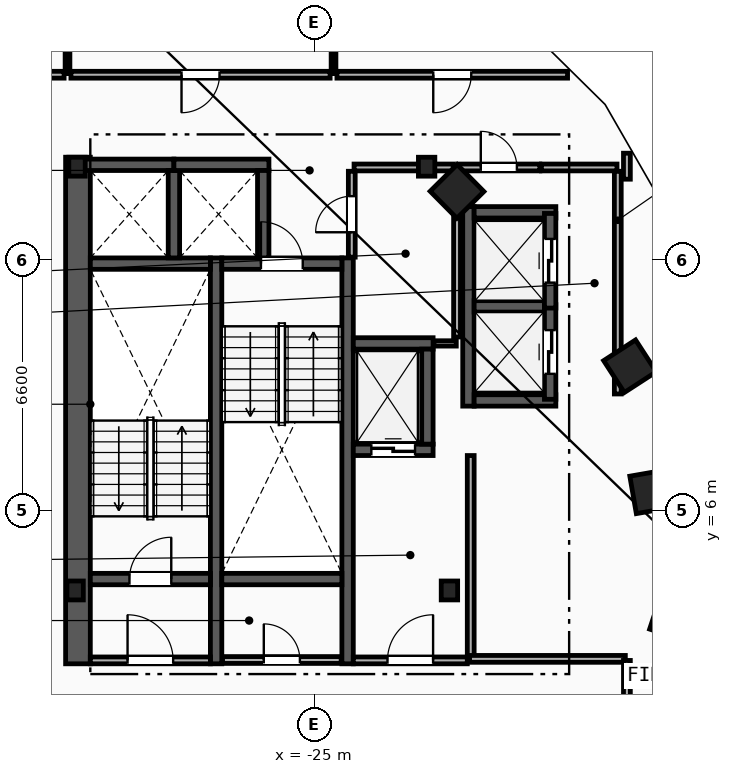
"""IFC4 building model, lengths in metres.
Left out: names, types, materials, properties, quantities, classifications, styles, units other than length and angle.
Written with IfcOpenShell. Run it as: python <this file> out.ifc"""

import sys

from ifc_helpers import new_model, si_unit, direction, frame, frame_2d, origin, origin_2d, place, context, subcontext, project, spatial, rectangle, i_section, extrude, element, fill, save


model = new_model("IFC4")
c1 = context("Model", 3, precision=1e-05, world=origin(), true_north=direction((0.0, 1.0)))
c2 = subcontext(c1, "Body", "Model", "MODEL_VIEW")
j1 = project(units=[si_unit("LENGTHUNIT", "METRE"), si_unit("PLANEANGLEUNIT", "RADIAN")], contexts=[c1])
p1 = place(None, origin())
s1 = spatial("IfcSite", under=j1, at=p1, CompositionType="ELEMENT")
p2 = place(p1, origin())
s2 = spatial("IfcBuilding", under=s1, at=p2, CompositionType="ELEMENT")
p3 = place(p2, frame((0.0, 0.0, 176.4)))
s3 = spatial("IfcBuildingStorey", under=s2, at=p3, CompositionType="ELEMENT", Elevation=176.4)
for number, where, z_axis, x_axis in (
    (1, (-31.3, 3.9, 0.0), (0.0, 0.0, 1.0), (1.0, 0.0, 0.0)),
    (2, (-21.45, 3.9, 0.0), (0.0, 0.0, 1.0), (1.0, 0.0, 0.0)),
    (3, (-22.05, 15.05, 0.0), (0.0, 0.0, 1.0), (1.0, 0.0, 0.0)),
    (4, (-31.25, 15.05, 0.0), (0.0, 0.0, 1.0), (1.0, 0.0, 0.0)),
):
    element("IfcColumn", number, at=place(p3, frame(where, z_axis=z_axis, x_axis=x_axis)), inside=s3, PredefinedType="COLUMN", context=c2, shape_type="SweptSolid", body=[
        extrude(i_section(OverallWidth=0.432, OverallDepth=0.498, WebThickness=0.056, FlangeThickness=0.089, FilletRadius=0.018, at=origin_2d()), origin(), (0.0, 0.0, 1.0), 3.6),
    ])
for number, where, z_axis, x_axis in (
    (5, (-15.55, 3.2, 0.0), (0.0, 0.0, 1.0), (0.315, 0.949, 0.0)),
    (6, (-16.125, 6.5, 0.0), (0.0, 0.0, 1.0), (-0.172, 0.985, 0.0)),
    (7, (-16.7, 9.8, 0.0), (0.0, 0.0, 1.0), (-0.544, 0.839, 0.0)),
    (8, (-21.25, 14.4, 0.0), (0.0, 0.0, 1.0), (-0.703, 0.711, 0.0)),
):
    element("IfcColumn", number, at=place(p3, frame(where, z_axis=z_axis, x_axis=x_axis)), inside=s3, PredefinedType="COLUMN", context=c2, shape_type="SweptSolid", body=[
        extrude(rectangle(XDim=1.0, YDim=1.0, at=origin_2d()), origin(), (0.0, 0.0, 1.0), 3.6),
    ])
p4 = place(p3, frame((-31.225, 1.97, 0.0), z_axis=(0.0, 0.0, 1.0), x_axis=(0.0, 1.0, 0.0)))
e9 = element("IfcWall", 9, at=p4, inside=s3, PredefinedType="SHEAR", context=c2, shape_type="SweptSolid", body=[
    extrude(rectangle(XDim=13.33, YDim=0.65, at=frame_2d((6.665, 0.0))), origin(), (0.0, 0.0, 1.0), 3.36),
])
for number, where, z_axis, x_axis in (
    (10, (-27.59, 1.97, 0.0), (0.0, 0.0, 1.0), (0.0, 1.0, 0.0)),
    (11, (-24.13, 1.97, 0.0), (0.0, 0.0, 1.0), (0.0, 1.0, 0.0)),
):
    element("IfcWall", number, at=place(p3, frame(where, z_axis=z_axis, x_axis=x_axis)), inside=s3, PredefinedType="SHEAR", context=c2, shape_type="SweptSolid", body=[
        extrude(rectangle(XDim=10.68, YDim=0.3, at=frame_2d((5.34, 0.0))), origin(), (0.0, 0.0, 1.0), 3.36),
    ])
p5 = place(p3, frame((-30.9, 4.2, 0.0), z_axis=(0.0, 0.0, 1.0), x_axis=(1.0, 0.0, 0.0)))
e12 = element("IfcWall", 12, at=p5, inside=s3, PredefinedType="SHEAR", context=c2, shape_type="SweptSolid", body=[
    extrude(rectangle(XDim=3.16, YDim=0.3, at=frame_2d((1.58, 0.0))), origin(), (0.0, 0.0, 1.0), 3.36),
])
p6 = place(p5, frame((1.03, 0.0, 0.0)))
e13 = element("IfcOpeningElement", 13, at=p6, cuts=e12, PredefinedType="OPENING", context=c2, shape_type="SweptSolid", body=[
    extrude(rectangle(XDim=1.1, YDim=2.15, at=frame_2d((0.55, 1.075))), frame((0.0, 0.16, 0.0), z_axis=(0.0, -1.0, 0.0), x_axis=(1.0, 0.0, 0.0)), (0.0, 0.0, 1.0), 0.32),
])
p7 = place(p3, frame((-30.9, 12.5, 0.0), z_axis=(0.0, 0.0, 1.0), x_axis=(1.0, 0.0, 0.0)))
e14 = element("IfcWall", 14, at=p7, inside=s3, PredefinedType="SHEAR", context=c2, shape_type="SweptSolid", body=[
    extrude(rectangle(XDim=3.16, YDim=0.3, at=frame_2d((1.58, 0.0))), origin(), (0.0, 0.0, 1.0), 3.36),
])
p8 = place(p3, frame((-27.44, 12.5, 0.0), z_axis=(0.0, 0.0, 1.0), x_axis=(1.0, 0.0, 0.0)))
e15 = element("IfcWall", 15, at=p8, inside=s3, PredefinedType="SHEAR", context=c2, shape_type="SweptSolid", body=[
    extrude(rectangle(XDim=3.16, YDim=0.3, at=frame_2d((1.58, 0.0))), origin(), (0.0, 0.0, 1.0), 3.36),
])
p9 = place(p8, frame((1.03, 0.0, 0.0)))
e16 = element("IfcOpeningElement", 16, at=p9, cuts=e15, PredefinedType="OPENING", context=c2, shape_type="SweptSolid", body=[
    extrude(rectangle(XDim=1.1, YDim=2.15, at=frame_2d((0.55, 1.075))), frame((0.0, 0.16, 0.0), z_axis=(0.0, -1.0, 0.0), x_axis=(1.0, 0.0, 0.0)), (0.0, 0.0, 1.0), 0.32),
])
p10 = place(p3, frame((-27.44, 4.2, 0.0), z_axis=(0.0, 0.0, 1.0), x_axis=(1.0, 0.0, 0.0)))
e17 = element("IfcWall", 17, at=p10, inside=s3, PredefinedType="SHEAR", context=c2, shape_type="SweptSolid", body=[
    extrude(rectangle(XDim=3.16, YDim=0.3, at=frame_2d((1.58, 0.0))), origin(), (0.0, 0.0, 1.0), 3.36),
])
p11 = place(p3, frame((-20.89, 2.15, 0.0), z_axis=(0.0, 0.0, 1.0), x_axis=(0.0, 1.0, 0.0)))
e18 = element("IfcWall", 18, at=p11, inside=s3, PredefinedType="PARTITIONING", context=c2, shape_type="SweptSolid", body=[
    extrude(rectangle(XDim=5.3, YDim=0.18, at=frame_2d((2.65, 0.0))), origin(), (0.0, 0.0, 1.0), 3.36),
])
p12 = place(p3, frame((-23.98, 2.06, 0.0), z_axis=(0.0, 0.0, 1.0), x_axis=(1.0, 0.0, 0.0)))
e19 = element("IfcWall", 19, at=p12, inside=s3, PredefinedType="PARTITIONING", context=c2, shape_type="SweptSolid", body=[
    extrude(rectangle(XDim=3.0, YDim=0.18, at=frame_2d((1.5, 0.0))), origin(), (0.0, 0.0, 1.0), 3.36),
])
p13 = place(p12, frame((0.9, 0.0, 0.0)))
e20 = element("IfcOpeningElement", 20, at=p13, cuts=e19, PredefinedType="OPENING", context=c2, shape_type="SweptSolid", body=[
    extrude(rectangle(XDim=1.2, YDim=2.15, at=frame_2d((0.6, 1.075))), frame((0.0, 0.1, 0.0), z_axis=(0.0, -1.0, 0.0), x_axis=(1.0, 0.0, 0.0)), (0.0, 0.0, 1.0), 0.2),
])
p14 = place(p3, frame((-30.9, 2.06, 0.0), z_axis=(0.0, 0.0, 1.0), x_axis=(1.0, 0.0, 0.0)))
e21 = element("IfcWall", 21, at=p14, inside=s3, PredefinedType="PARTITIONING", context=c2, shape_type="SweptSolid", body=[
    extrude(rectangle(XDim=3.16, YDim=0.18, at=frame_2d((1.58, 0.0))), origin(), (0.0, 0.0, 1.0), 3.36),
])
p15 = place(p14, frame((0.98, 0.0, 0.0)))
e22 = element("IfcOpeningElement", 22, at=p15, cuts=e21, PredefinedType="OPENING", context=c2, shape_type="SweptSolid", body=[
    extrude(rectangle(XDim=1.2, YDim=2.15, at=frame_2d((0.6, 1.075))), frame((0.0, 0.1, 0.0), z_axis=(0.0, -1.0, 0.0), x_axis=(1.0, 0.0, 0.0)), (0.0, 0.0, 1.0), 0.2),
])
p16 = place(p3, frame((-23.98, 7.6, 0.0), z_axis=(0.0, 0.0, 1.0), x_axis=(1.0, 0.0, 0.0)))
e23 = element("IfcWall", 23, at=p16, inside=s3, PredefinedType="SHEAR", context=c2, shape_type="SweptSolid", body=[
    extrude(rectangle(XDim=2.1, YDim=0.3, at=frame_2d((1.05, 0.0))), origin(), (0.0, 0.0, 1.0), 3.36),
])
p17 = place(p16, frame((0.475, 0.0, 0.0)))
e24 = element("IfcOpeningElement", 24, at=p17, cuts=e23, PredefinedType="OPENING", context=c2, shape_type="SweptSolid", body=[
    extrude(rectangle(XDim=1.15, YDim=2.2, at=frame_2d((0.575, 1.1))), frame((0.0, 0.16, 0.0), z_axis=(0.0, -1.0, 0.0), x_axis=(1.0, 0.0, 0.0)), (0.0, 0.0, 1.0), 0.32),
])
p18 = place(p3, frame((-23.98, 10.4, 0.0), z_axis=(0.0, 0.0, 1.0), x_axis=(1.0, 0.0, 0.0)))
e25 = element("IfcWall", 25, at=p18, inside=s3, PredefinedType="SHEAR", context=c2, shape_type="SweptSolid", body=[
    extrude(rectangle(XDim=2.1, YDim=0.3, at=frame_2d((1.05, 0.0))), origin(), (0.0, 0.0, 1.0), 3.36),
])
for number, where, z_axis, x_axis in (
    (26, (-22.03, 7.75, 0.0), (0.0, 0.0, 1.0), (0.0, 1.0, 0.0)),
    (27, (-31.2, 15.1, 0.0), (0.0, 0.0, 1.0), (1.0, 0.0, 0.0)),
):
    element("IfcWall", number, at=place(p3, frame(where, z_axis=z_axis, x_axis=x_axis)), inside=s3, PredefinedType="SHEAR", context=c2, shape_type="SweptSolid", body=[
        extrude(rectangle(XDim=2.5, YDim=0.3, at=frame_2d((1.25, 0.0))), origin(), (0.0, 0.0, 1.0), 3.36),
    ])
p19 = place(p3, frame((-28.7, 12.65, 0.0), z_axis=(0.0, 0.0, 1.0), x_axis=(0.0, 1.0, 0.0)))
e28 = element("IfcWall", 28, at=p19, inside=s3, PredefinedType="SHEAR", context=c2, shape_type="SweptSolid", body=[
    extrude(rectangle(XDim=2.3, YDim=0.3, at=frame_2d((1.15, 0.0))), origin(), (0.0, 0.0, 1.0), 3.36),
])
p20 = place(p3, frame((-28.7, 15.1, 0.0), z_axis=(0.0, 0.0, 1.0), x_axis=(1.0, 0.0, 0.0)))
e29 = element("IfcWall", 29, at=p20, inside=s3, PredefinedType="SHEAR", context=c2, shape_type="SweptSolid", body=[
    extrude(rectangle(XDim=2.5, YDim=0.3, at=frame_2d((1.25, 0.0))), origin(), (0.0, 0.0, 1.0), 3.36),
])
p21 = place(p3, frame((-26.35, 12.65, 0.0), z_axis=(0.0, 0.0, 1.0), x_axis=(0.0, 1.0, 0.0)))
e30 = element("IfcWall", 30, at=p21, inside=s3, PredefinedType="SHEAR", context=c2, shape_type="SweptSolid", body=[
    extrude(rectangle(XDim=2.3, YDim=0.3, at=frame_2d((1.15, 0.0))), origin(), (0.0, 0.0, 1.0), 3.36),
])
p22 = place(p3, frame((-20.95, 8.75, 0.0), z_axis=(0.0, 0.0, 1.0), x_axis=(0.0, 1.0, 0.0)))
e31 = element("IfcWall", 31, at=p22, inside=s3, PredefinedType="SHEAR", context=c2, shape_type="SweptSolid", body=[
    extrude(rectangle(XDim=5.25, YDim=0.3, at=frame_2d((2.625, 0.0))), origin(), (0.0, 0.0, 1.0), 3.36),
])
for number, where, z_axis, x_axis in (
    (32, (-20.8, 8.9, 0.0), (0.0, 0.0, 1.0), (1.0, 0.0, 0.0)),
    (33, (-20.8, 13.85, 0.0), (0.0, 0.0, 1.0), (1.0, 0.0, 0.0)),
):
    element("IfcWall", number, at=place(p3, frame(where, z_axis=z_axis, x_axis=x_axis)), inside=s3, PredefinedType="SHEAR", context=c2, shape_type="SweptSolid", body=[
        extrude(rectangle(XDim=2.15, YDim=0.3, at=frame_2d((1.075, 0.0))), origin(), (0.0, 0.0, 1.0), 3.36),
    ])
p23 = place(p3, frame((-20.8, 11.375, 0.0), z_axis=(0.0, 0.0, 1.0), x_axis=(1.0, 0.0, 0.0)))
e34 = element("IfcWall", 34, at=p23, inside=s3, PredefinedType="SHEAR", context=c2, shape_type="SweptSolid", body=[
    extrude(rectangle(XDim=1.85, YDim=0.3, at=frame_2d((0.925, 0.0))), origin(), (0.0, 0.0, 1.0), 3.36),
])
p24 = place(p3, frame((-18.8, 8.93, 0.0), z_axis=(0.0, 0.0, 1.0), x_axis=(0.0, 1.0, 0.0)))
e35 = element("IfcWall", 35, at=p24, inside=s3, PredefinedType="SHEAR", context=c2, shape_type="SweptSolid", body=[
    extrude(rectangle(XDim=2.49, YDim=0.3, at=frame_2d((1.245, 0.0))), origin(), (0.0, 0.0, 1.0), 3.36),
])
p25 = place(p24, frame((0.67, 0.0, 0.0)))
e36 = element("IfcOpeningElement", 36, at=p25, cuts=e35, PredefinedType="OPENING", context=c2, shape_type="SweptSolid", body=[
    extrude(rectangle(XDim=1.15, YDim=2.2, at=frame_2d((0.575, 1.1))), frame((0.0, 0.16, 0.0), z_axis=(0.0, -1.0, 0.0), x_axis=(1.0, 0.0, 0.0)), (0.0, 0.0, 1.0), 0.32),
])
p26 = place(p3, frame((-18.8, 11.33, 0.0), z_axis=(0.0, 0.0, 1.0), x_axis=(0.0, 1.0, 0.0)))
e37 = element("IfcWall", 37, at=p26, inside=s3, PredefinedType="SHEAR", context=c2, shape_type="SweptSolid", body=[
    extrude(rectangle(XDim=2.49, YDim=0.3, at=frame_2d((1.245, 0.0))), origin(), (0.0, 0.0, 1.0), 3.36),
])
p27 = place(p26, frame((0.67, 0.0, 0.0)))
e38 = element("IfcOpeningElement", 38, at=p27, cuts=e37, PredefinedType="OPENING", context=c2, shape_type="SweptSolid", body=[
    extrude(rectangle(XDim=1.15, YDim=2.2, at=frame_2d((0.575, 1.1))), frame((0.0, 0.16, 0.0), z_axis=(0.0, -1.0, 0.0), x_axis=(1.0, 0.0, 0.0)), (0.0, 0.0, 1.0), 0.32),
])
p28 = place(p3, frame((-17.02, 9.07, 0.0), z_axis=(0.0, 0.0, 1.0), x_axis=(0.0, 1.0, 0.0)))
e39 = element("IfcWall", 39, at=p28, inside=s3, PredefinedType="PARTITIONING", context=c2, shape_type="SweptSolid", body=[
    extrude(rectangle(XDim=5.86, YDim=0.18, at=frame_2d((2.93, 0.0))), origin(), (0.0, 0.0, 1.0), 3.36),
])
p29 = place(p3, frame((-21.23, 15.03, 0.0), z_axis=(0.0, 0.0, 1.0), x_axis=(1.0, 0.0, 0.0)))
e40 = element("IfcWall", 40, at=p29, inside=s3, PredefinedType="PARTITIONING", context=c2, shape_type="SweptSolid", body=[
    extrude(rectangle(XDim=2.16, YDim=0.18, at=frame_2d((1.08, 0.0))), origin(), (0.0, 0.0, 1.0), 3.36),
])
p30 = place(p29, frame((0.605, 0.0, 0.0)))
e41 = element("IfcOpeningElement", 41, at=p30, cuts=e40, PredefinedType="OPENING", context=c2, shape_type="SweptSolid", body=[
    extrude(rectangle(XDim=0.95, YDim=2.1, at=frame_2d((0.475, 1.05))), frame((0.0, 0.1, 0.0), z_axis=(0.0, -1.0, 0.0), x_axis=(1.0, 0.0, 0.0)), (0.0, 0.0, 1.0), 0.2),
])
p31 = place(p3, frame((-19.03, 15.03, 0.0), z_axis=(0.0, 0.0, 1.0), x_axis=(1.0, 0.0, 0.0)))
e42 = element("IfcWall", 42, at=p31, inside=s3, PredefinedType="PARTITIONING", context=c2, shape_type="SweptSolid", body=[
    extrude(rectangle(XDim=1.99, YDim=0.18, at=frame_2d((0.995, 0.0))), origin(), (0.0, 0.0, 1.0), 3.36),
])
p32 = place(p3, frame((-21.86, 10.4, 0.0), z_axis=(0.0, 0.0, 1.0), x_axis=(1.0, 0.0, 0.0)))
e43 = element("IfcWall", 43, at=p32, inside=s3, PredefinedType="PARTITIONING", context=c2, shape_type="SweptSolid", body=[
    extrude(rectangle(XDim=0.59, YDim=0.14, at=frame_2d((0.295, 0.0))), origin(), (0.0, 0.0, 1.0), 3.36),
])
p33 = place(p3, frame((-21.25, 10.57, 0.0), z_axis=(0.0, 0.0, 1.0), x_axis=(0.0, 1.0, 0.0)))
e44 = element("IfcWall", 44, at=p33, inside=s3, PredefinedType="PARTITIONING", context=c2, shape_type="SweptSolid", body=[
    extrude(rectangle(XDim=4.36, YDim=0.18, at=frame_2d((2.18, 0.0))), origin(), (0.0, 0.0, 1.0), 3.36),
])
p34 = place(p3, frame((-23.96, 15.03, 0.0), z_axis=(0.0, 0.0, 1.0), x_axis=(1.0, 0.0, 0.0)))
e45 = element("IfcWall", 45, at=p34, inside=s3, PredefinedType="PARTITIONING", context=c2, shape_type="SweptSolid", body=[
    extrude(rectangle(XDim=2.61, YDim=0.18, at=frame_2d((1.305, 0.0))), origin(), (0.0, 0.0, 1.0), 2.433),
])
p35 = place(p3, frame((-27.42, 2.07, 0.0), z_axis=(0.0, 0.0, 1.0), x_axis=(1.0, 0.0, 0.0)))
e46 = element("IfcWall", 46, at=p35, inside=s3, PredefinedType="PARTITIONING", context=c2, shape_type="SweptSolid", body=[
    extrude(rectangle(XDim=3.12, YDim=0.18, at=frame_2d((1.56, 0.0))), origin(), (0.0, 0.0, 1.0), 3.36),
])
p36 = place(p35, frame((1.085, 0.0, 0.0)))
e47 = element("IfcOpeningElement", 47, at=p36, cuts=e46, PredefinedType="OPENING", context=c2, shape_type="SweptSolid", body=[
    extrude(rectangle(XDim=0.95, YDim=2.1, at=frame_2d((0.475, 1.05))), frame((0.0, 0.1, 0.0), z_axis=(0.0, -1.0, 0.0), x_axis=(1.0, 0.0, 0.0)), (0.0, 0.0, 1.0), 0.2),
])
p37 = place(p3, frame((-24.02, 12.67, 0.0), z_axis=(0.0, 0.0, 1.0), x_axis=(0.0, 1.0, 0.0)))
e48 = element("IfcWall", 48, at=p37, inside=s3, PredefinedType="PARTITIONING", context=c2, shape_type="SweptSolid", body=[
    extrude(rectangle(XDim=2.26, YDim=0.18, at=frame_2d((1.13, 0.0))), origin(), (0.0, 0.0, 1.0), 3.36),
])
p38 = place(p37, frame((0.655, 0.0, 0.0)))
e49 = element("IfcOpeningElement", 49, at=p38, cuts=e48, PredefinedType="OPENING", context=c2, shape_type="SweptSolid", body=[
    extrude(rectangle(XDim=0.95, YDim=2.1, at=frame_2d((0.475, 1.05))), frame((0.0, 0.1, 0.0), z_axis=(0.0, -1.0, 0.0), x_axis=(1.0, 0.0, 0.0)), (0.0, 0.0, 1.0), 0.2),
])
p39 = place(p3, frame((-31.5, 17.5, 0.0), z_axis=(0.0, 0.0, 1.0), x_axis=(0.0, 1.0, 0.0)))
e50 = element("IfcWall", 50, at=p39, inside=s3, PredefinedType="PARTITIONING", context=c2, shape_type="SweptSolid", body=[
    extrude(rectangle(XDim=5.902, YDim=0.125, at=frame_2d((2.951, 0.0))), origin(), (0.0, 0.0, 1.0), 3.36),
])
p40 = place(p3, frame((-24.5, 17.5, 0.0), z_axis=(0.0, 0.0, 1.0), x_axis=(0.0, 1.0, 0.0)))
e51 = element("IfcWall", 51, at=p40, inside=s3, PredefinedType="PARTITIONING", context=c2, shape_type="SweptSolid", body=[
    extrude(rectangle(XDim=4.525, YDim=0.125, at=frame_2d((2.263, 0.0))), origin(), (0.0, 0.0, 1.0), 3.36),
])
p41 = place(p3, frame((-16.822, 2.1, 0.0), z_axis=(0.0, 0.0, 1.0), x_axis=(-1.0, 0.0, 0.0)))
e52 = element("IfcWall", 52, at=p41, inside=s3, PredefinedType="PARTITIONING", context=c2, shape_type="SweptSolid", body=[
    extrude(rectangle(XDim=4.098, YDim=0.18, at=frame_2d((2.049, 0.0))), origin(), (0.0, 0.0, 1.0), 3.36),
])
p42 = place(p3, frame((-16.78, -0.329, 0.0), z_axis=(0.0, 0.0, 1.0), x_axis=(0.0, 1.0, 0.0)))
e53 = element("IfcWall", 53, at=p42, inside=s3, PredefinedType="PARTITIONING", context=c2, shape_type="SweptSolid", body=[
    extrude(rectangle(XDim=2.387, YDim=0.18, at=frame_2d((1.194, 0.0))), origin(), (0.0, 0.0, 1.0), 3.36),
])
p43 = place(p3, frame((-16.78, 14.721, 0.0), z_axis=(0.0, 0.0, 1.0), x_axis=(0.0, 1.0, 0.0)))
e54 = element("IfcWall", 54, at=p43, inside=s3, PredefinedType="PARTITIONING", context=c2, shape_type="SweptSolid", body=[
    extrude(rectangle(XDim=0.684, YDim=0.18, at=frame_2d((0.342, 0.0))), origin(), (0.0, 0.0, 1.0), 3.36),
])
p44 = place(p3, frame((-31.59, 17.47, 0.0), z_axis=(0.0, 0.0, 1.0), x_axis=(-1.0, 0.0, 0.0)))
e55 = element("IfcWall", 55, at=p44, inside=s3, PredefinedType="PARTITIONING", context=c2, shape_type="SweptSolid", body=[
    extrude(rectangle(XDim=2.038, YDim=0.18, at=frame_2d((1.019, 0.0))), origin(), (0.0, 0.0, 1.0), 3.36),
])
p45 = place(p3, frame((-18.342, 17.47, 0.0), z_axis=(0.0, 0.0, 1.0), x_axis=(-1.0, 0.0, 0.0)))
e56 = element("IfcWall", 56, at=p45, inside=s3, PredefinedType="PARTITIONING", context=c2, shape_type="SweptSolid", body=[
    extrude(rectangle(XDim=6.068, YDim=0.18, at=frame_2d((3.034, 0.0))), origin(), (0.0, 0.0, 1.0), 3.36),
])
p46 = place(p45, frame((2.534, 0.0, 0.0)))
e57 = element("IfcOpeningElement", 57, at=p46, cuts=e56, PredefinedType="OPENING", context=c2, shape_type="SweptSolid", body=[
    extrude(rectangle(XDim=1.0, YDim=2.15, at=frame_2d((0.5, 1.075))), frame((0.0, 0.1, 0.0), z_axis=(0.0, -1.0, 0.0), x_axis=(1.0, 0.0, 0.0)), (0.0, 0.0, 1.0), 0.2),
])
p47 = place(p3, frame((-24.59, 17.47, 0.0), z_axis=(0.0, 0.0, 1.0), x_axis=(-1.0, 0.0, 0.0)))
e58 = element("IfcWall", 58, at=p47, inside=s3, PredefinedType="PARTITIONING", context=c2, shape_type="SweptSolid", body=[
    extrude(rectangle(XDim=6.82, YDim=0.18, at=frame_2d((3.41, 0.0))), origin(), (0.0, 0.0, 1.0), 3.36),
])
p48 = place(p47, frame((2.91, 0.0, 0.0)))
e59 = element("IfcOpeningElement", 59, at=p48, cuts=e58, PredefinedType="OPENING", context=c2, shape_type="SweptSolid", body=[
    extrude(rectangle(XDim=1.0, YDim=2.15, at=frame_2d((0.5, 1.075))), frame((0.0, 0.1, 0.0), z_axis=(0.0, -1.0, 0.0), x_axis=(1.0, 0.0, 0.0)), (0.0, 0.0, 1.0), 0.2),
])
p49 = place(p6, origin())
e60 = element("IfcDoor", 60, at=p49, inside=s3, OperationType="SINGLE_SWING_RIGHT", PredefinedType="DOOR", context=c2, shape_type="SweptSolid", body=[
    extrude(rectangle(XDim=1.1, YDim=2.15, at=frame_2d((0.55, 1.075))), frame((0.0, 0.025, 0.0), z_axis=(0.0, -1.0, 0.0), x_axis=(1.0, 0.0, 0.0)), (0.0, 0.0, 1.0), 0.05),
])
fill(e13, e60)
p50 = place(p9, origin())
e61 = element("IfcDoor", 61, at=p50, inside=s3, OperationType="SINGLE_SWING_LEFT", PredefinedType="DOOR", context=c2, shape_type="SweptSolid", body=[
    extrude(rectangle(XDim=1.1, YDim=2.15, at=frame_2d((0.55, 1.075))), frame((0.0, 0.025, 0.0), z_axis=(0.0, -1.0, 0.0), x_axis=(1.0, 0.0, 0.0)), (0.0, 0.0, 1.0), 0.05),
])
fill(e16, e61)
p51 = place(p13, origin())
e62 = element("IfcDoor", 62, at=p51, inside=s3, OperationType="SINGLE_SWING_RIGHT", PredefinedType="DOOR", context=c2, shape_type="SweptSolid", body=[
    extrude(rectangle(XDim=1.2, YDim=2.15, at=frame_2d((0.6, 1.075))), frame((0.0, 0.025, 0.0), z_axis=(0.0, -1.0, 0.0), x_axis=(1.0, 0.0, 0.0)), (0.0, 0.0, 1.0), 0.05),
])
fill(e20, e62)
p52 = place(p15, origin())
e63 = element("IfcDoor", 63, at=p52, inside=s3, OperationType="SINGLE_SWING_LEFT", PredefinedType="DOOR", context=c2, shape_type="SweptSolid", body=[
    extrude(rectangle(XDim=1.2, YDim=2.15, at=frame_2d((0.6, 1.075))), frame((0.0, 0.025, 0.0), z_axis=(0.0, -1.0, 0.0), x_axis=(1.0, 0.0, 0.0)), (0.0, 0.0, 1.0), 0.05),
])
fill(e22, e63)
p53 = place(p17, origin())
e64 = element("IfcDoor", 64, at=p53, inside=s3, OperationType="SLIDING_TO_LEFT", PredefinedType="TRAPDOOR", context=c2, shape_type="SweptSolid", body=[
    extrude(rectangle(XDim=1.15, YDim=2.2, at=frame_2d((0.575, 1.1))), frame((0.0, 0.025, 0.0), z_axis=(0.0, -1.0, 0.0), x_axis=(1.0, 0.0, 0.0)), (0.0, 0.0, 1.0), 0.05),
])
fill(e24, e64)
p54 = place(p25, origin())
e65 = element("IfcDoor", 65, at=p54, inside=s3, OperationType="SLIDING_TO_LEFT", PredefinedType="TRAPDOOR", context=c2, shape_type="SweptSolid", body=[
    extrude(rectangle(XDim=1.15, YDim=2.2, at=frame_2d((0.575, 1.1))), frame((0.0, 0.025, 0.0), z_axis=(0.0, -1.0, 0.0), x_axis=(1.0, 0.0, 0.0)), (0.0, 0.0, 1.0), 0.05),
])
fill(e36, e65)
p55 = place(p27, origin())
e66 = element("IfcDoor", 66, at=p55, inside=s3, OperationType="SLIDING_TO_LEFT", PredefinedType="TRAPDOOR", context=c2, shape_type="SweptSolid", body=[
    extrude(rectangle(XDim=1.15, YDim=2.2, at=frame_2d((0.575, 1.1))), frame((0.0, 0.025, 0.0), z_axis=(0.0, -1.0, 0.0), x_axis=(1.0, 0.0, 0.0)), (0.0, 0.0, 1.0), 0.05),
])
fill(e38, e66)
p56 = place(p48, origin())
e67 = element("IfcDoor", 67, at=p56, inside=s3, OperationType="SINGLE_SWING_RIGHT", PredefinedType="DOOR", context=c2, shape_type="SweptSolid", body=[
    extrude(rectangle(XDim=1.0, YDim=2.15, at=frame_2d((0.5, 1.075))), frame((0.0, 0.025, 0.0), z_axis=(0.0, -1.0, 0.0), x_axis=(1.0, 0.0, 0.0)), (0.0, 0.0, 1.0), 0.05),
])
fill(e59, e67)
p57 = place(p46, origin())
e68 = element("IfcDoor", 68, at=p57, inside=s3, OperationType="SINGLE_SWING_RIGHT", PredefinedType="DOOR", context=c2, shape_type="SweptSolid", body=[
    extrude(rectangle(XDim=1.0, YDim=2.15, at=frame_2d((0.5, 1.075))), frame((0.0, 0.025, 0.0), z_axis=(0.0, -1.0, 0.0), x_axis=(1.0, 0.0, 0.0)), (0.0, 0.0, 1.0), 0.05),
])
fill(e57, e68)
p58 = place(p36, origin())
e69 = element("IfcDoor", 69, at=p58, inside=s3, OperationType="SINGLE_SWING_LEFT", PredefinedType="DOOR", context=c2, shape_type="SweptSolid", body=[
    extrude(rectangle(XDim=0.95, YDim=2.1, at=frame_2d((0.475, 1.05))), frame((0.0, 0.025, 0.0), z_axis=(0.0, -1.0, 0.0), x_axis=(1.0, 0.0, 0.0)), (0.0, 0.0, 1.0), 0.05),
])
fill(e47, e69)
p59 = place(p38, origin())
e70 = element("IfcDoor", 70, at=p59, inside=s3, OperationType="SINGLE_SWING_LEFT", PredefinedType="DOOR", context=c2, shape_type="SweptSolid", body=[
    extrude(rectangle(XDim=0.95, YDim=2.1, at=frame_2d((0.475, 1.05))), frame((0.0, 0.025, 0.0), z_axis=(0.0, -1.0, 0.0), x_axis=(1.0, 0.0, 0.0)), (0.0, 0.0, 1.0), 0.05),
])
fill(e49, e70)
p60 = place(p30, origin())
e71 = element("IfcDoor", 71, at=p60, inside=s3, OperationType="SINGLE_SWING_LEFT", PredefinedType="DOOR", context=c2, shape_type="SweptSolid", body=[
    extrude(rectangle(XDim=0.95, YDim=2.1, at=frame_2d((0.475, 1.05))), frame((0.0, 0.025, 0.0), z_axis=(0.0, -1.0, 0.0), x_axis=(1.0, 0.0, 0.0)), (0.0, 0.0, 1.0), 0.05),
])
fill(e41, e71)
save(model, sys.argv[1])
